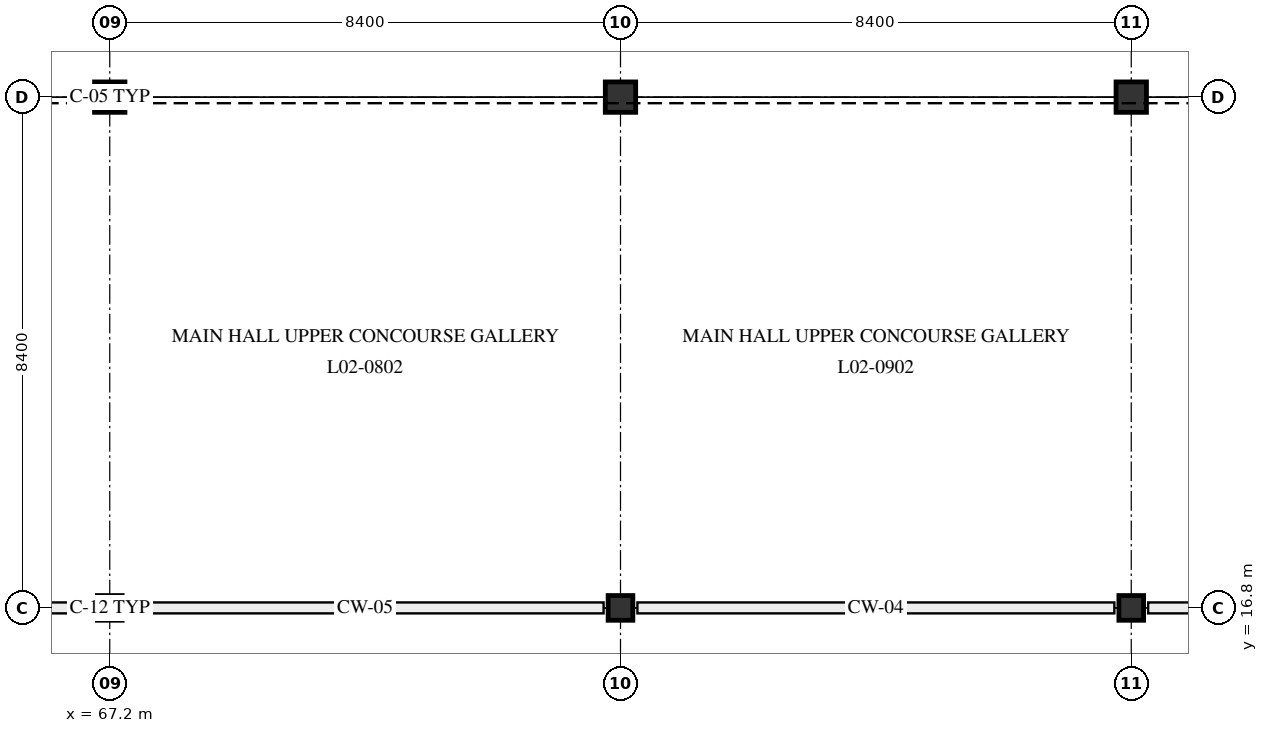
"""IFC4 building model, lengths in metres.
Left out: names, types, materials, properties, quantities, classifications, styles, units other than length and angle.
Written with IfcOpenShell. Run it as: python <this file> out.ifc"""

import sys

from ifc_helpers import new_model, si_unit, direction, frame, origin, origin_2d, place, context, subcontext, project, spatial, rectangle, hollow_circle, extrude, element, save


model = new_model("IFC4")
c1 = context("Model", 3, precision=1e-05, world=origin(), true_north=direction((0.0, 1.0)))
c2 = subcontext(c1, "Body", "Model", "MODEL_VIEW")
j1 = project(units=[si_unit("LENGTHUNIT", "METRE"), si_unit("PLANEANGLEUNIT", "RADIAN")], contexts=[c1])
p1 = place(None, origin())
s1 = spatial("IfcSite", under=j1, at=p1, CompositionType="ELEMENT")
p2 = place(p1, origin())
s2 = spatial("IfcBuilding", under=s1, at=p2, CompositionType="ELEMENT")
p3 = place(p2, frame((0.0, 0.0, 9.3)))
s3 = spatial("IfcBuildingStorey", under=s2, at=p3, CompositionType="ELEMENT", Elevation=9.3)
p4 = place(p3, frame((67.2, 16.8, 0.0), z_axis=(0.0, 0.0, 1.0), x_axis=(1.0, 0.0, 0.0)))
e1 = element("IfcColumn", 1, at=p4, inside=s3, PredefinedType="COLUMN", context=c2, shape_type="SweptSolid", body=[
    extrude(hollow_circle(Radius=0.203, WallThickness=0.016, at=origin_2d()), origin(), (0.0, 0.0, 1.0), 5.1),
])
p5 = place(p3, frame((67.2, 25.2, 0.0), z_axis=(0.0, 0.0, 1.0), x_axis=(1.0, 0.0, 0.0)))
e2 = element("IfcColumn", 2, at=p5, inside=s3, PredefinedType="COLUMN", context=c2, shape_type="SweptSolid", body=[
    extrude(rectangle(XDim=0.5, YDim=0.5, at=origin_2d()), origin(), (0.0, 0.0, 1.0), 5.1),
])
p6 = place(p3, frame((75.6, 16.8, 0.0), z_axis=(0.0, 0.0, 1.0), x_axis=(1.0, 0.0, 0.0)))
e3 = element("IfcColumn", 3, at=p6, inside=s3, PredefinedType="COLUMN", context=c2, shape_type="SweptSolid", body=[
    extrude(hollow_circle(Radius=0.203, WallThickness=0.016, at=origin_2d()), origin(), (0.0, 0.0, 1.0), 5.1),
])
p7 = place(p3, frame((75.6, 25.2, 0.0), z_axis=(0.0, 0.0, 1.0), x_axis=(1.0, 0.0, 0.0)))
e4 = element("IfcColumn", 4, at=p7, inside=s3, PredefinedType="COLUMN", context=c2, shape_type="SweptSolid", body=[
    extrude(rectangle(XDim=0.5, YDim=0.5, at=origin_2d()), origin(), (0.0, 0.0, 1.0), 5.1),
])
p8 = place(p3, frame((84.0, 16.8, 0.0), z_axis=(0.0, 0.0, 1.0), x_axis=(1.0, 0.0, 0.0)))
e5 = element("IfcColumn", 5, at=p8, inside=s3, PredefinedType="COLUMN", context=c2, shape_type="SweptSolid", body=[
    extrude(hollow_circle(Radius=0.203, WallThickness=0.016, at=origin_2d()), origin(), (0.0, 0.0, 1.0), 5.1),
])
p9 = place(p3, frame((84.0, 25.2, 0.0), z_axis=(0.0, 0.0, 1.0), x_axis=(1.0, 0.0, 0.0)))
e6 = element("IfcColumn", 6, at=p9, inside=s3, PredefinedType="COLUMN", context=c2, shape_type="SweptSolid", body=[
    extrude(rectangle(XDim=0.5, YDim=0.5, at=origin_2d()), origin(), (0.0, 0.0, 1.0), 5.1),
])
save(model, sys.argv[1])
